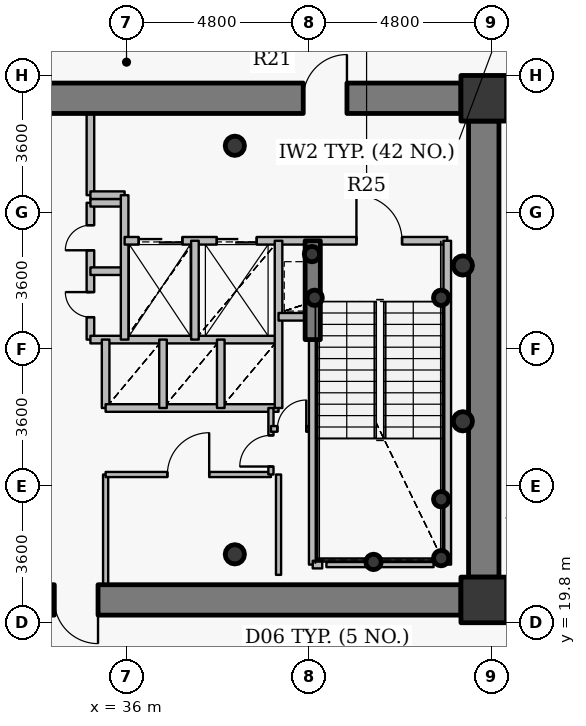
"""IFC4 building model, lengths in metres.
Left out: names, types, materials, properties, quantities, classifications, styles, units other than length and angle.
Written with IfcOpenShell. Run it as: python <this file> out.ifc"""

import sys

from ifc_helpers import new_model, si_unit, direction, frame, frame_2d, origin, origin_2d, place, context, subcontext, project, spatial, rectangle, hollow_circle, extrude, source, transform, mapped, element, fill, save


model = new_model("IFC4")
c1 = context("Model", 3, precision=1e-05, world=origin(), true_north=direction((0.0, 1.0)))
c2 = subcontext(c1, "Body", "Model", "MODEL_VIEW")
j1 = project(units=[si_unit("LENGTHUNIT", "METRE"), si_unit("PLANEANGLEUNIT", "RADIAN")], contexts=[c1])
p1 = place(None, origin())
s1 = spatial("IfcSite", under=j1, at=p1, CompositionType="ELEMENT")
p2 = place(p1, origin())
s2 = spatial("IfcBuilding", under=s1, at=p2, CompositionType="ELEMENT")
p3 = place(p2, frame((0.0, 0.0, 197.4)))
s3 = spatial("IfcBuildingStorey", under=s2, at=p3, CompositionType="ELEMENT", Elevation=197.4)
for number, where, z_axis, x_axis in (
    (1, (45.4, 20.4, 0.0), (0.0, 0.0, 1.0), (1.0, 0.0, 0.0)),
    (2, (45.4, 33.6, 0.0), (0.0, 0.0, 1.0), (1.0, 0.0, 0.0)),
):
    element("IfcColumn", number, at=place(p3, frame(where, z_axis=z_axis, x_axis=x_axis)), inside=s3, PredefinedType="COLUMN", context=c2, shape_type="SweptSolid", body=[
        extrude(rectangle(XDim=1.2, YDim=1.2, at=origin_2d()), origin(), (0.0, 0.0, 1.0), 3.75),
    ])
for number, where, z_axis, x_axis in (
    (3, (38.85, 21.6, 0.0), (0.0, 0.0, 1.0), (1.0, 0.0, 0.0)),
    (4, (38.85, 32.35, 0.0), (0.0, 0.0, 1.0), (1.0, 0.0, 0.0)),
):
    element("IfcColumn", number, at=place(p3, frame(where, z_axis=z_axis, x_axis=x_axis)), inside=s3, PredefinedType="COLUMN", context=c2, shape_type="SweptSolid", body=[
        extrude(hollow_circle(Radius=0.254, WallThickness=0.02, at=origin_2d()), origin(), (0.0, 0.0, 1.0), 3.75),
    ])
for number, where, z_axis, x_axis in (
    (5, (44.28, 21.5, 0.0), (0.0, 0.0, 1.0), (1.0, 0.0, 0.0)),
    (6, (44.28, 23.05, 0.0), (0.0, 0.0, 1.0), (1.0, 0.0, 0.0)),
    (7, (42.5, 21.4, 0.0), (0.0, 0.0, 1.0), (1.0, 0.0, 0.0)),
    (8, (40.95, 28.35, 0.0), (0.0, 0.0, 1.0), (1.0, 0.0, 0.0)),
    (9, (44.28, 28.35, 0.0), (0.0, 0.0, 1.0), (1.0, 0.0, 0.0)),
    (10, (40.88, 29.5, 0.0), (0.0, 0.0, 1.0), (1.0, 0.0, 0.0)),
):
    element("IfcColumn", number, at=place(p3, frame(where, z_axis=z_axis, x_axis=x_axis)), inside=s3, PredefinedType="COLUMN", context=c2, shape_type="SweptSolid", body=[
        extrude(hollow_circle(Radius=0.203, WallThickness=0.016, at=origin_2d()), origin(), (0.0, 0.0, 1.0), 3.75),
    ])
p4 = place(p3, frame((27.2, 33.6, 0.0), z_axis=(0.0, 0.0, 1.0), x_axis=(1.0, 0.0, 0.0)))
e11 = element("IfcWall", 11, at=p4, inside=s3, PredefinedType="SHEAR", context=c2, shape_type="SweptSolid", body=[
    extrude(rectangle(XDim=17.6, YDim=0.8, at=frame_2d((8.8, 0.0))), origin(), (0.0, 0.0, 1.0), 2.95),
])
p5 = place(p4, frame((13.45, 0.0, 0.0)))
e12 = element("IfcOpeningElement", 12, at=p5, cuts=e11, PredefinedType="OPENING", context=c2, shape_type="SweptSolid", body=[
    extrude(rectangle(XDim=1.15, YDim=2.15, at=origin_2d()), frame((0.575, 0.41, 1.075), z_axis=(0.0, -1.0, 0.0), x_axis=(1.0, 0.0, 0.0)), (0.0, 0.0, 1.0), 0.82),
])
p6 = place(p3, frame((45.4, 33.0, 0.0), z_axis=(0.0, 0.0, 1.0), x_axis=(0.0, -1.0, 0.0)))
e13 = element("IfcWall", 13, at=p6, inside=s3, PredefinedType="SHEAR", context=c2, shape_type="SweptSolid", body=[
    extrude(rectangle(XDim=12.0, YDim=0.8, at=frame_2d((6.0, 0.0))), origin(), (0.0, 0.0, 1.0), 2.95),
])
p7 = place(p3, frame((44.8, 20.4, 0.0), z_axis=(0.0, 0.0, 1.0), x_axis=(-1.0, 0.0, 0.0)))
e14 = element("IfcWall", 14, at=p7, inside=s3, PredefinedType="SHEAR", context=c2, shape_type="SweptSolid", body=[
    extrude(rectangle(XDim=17.6, YDim=0.8, at=frame_2d((8.8, 0.0))), origin(), (0.0, 0.0, 1.0), 2.95),
])
p8 = place(p7, frame((9.55, 0.0, 0.0)))
e15 = element("IfcOpeningElement", 15, at=p8, cuts=e14, PredefinedType="OPENING", context=c2, shape_type="SweptSolid", body=[
    extrude(rectangle(XDim=1.15, YDim=2.15, at=origin_2d()), frame((0.575, 0.41, 1.075), z_axis=(0.0, -1.0, 0.0), x_axis=(1.0, 0.0, 0.0)), (0.0, 0.0, 1.0), 0.82),
])
p9 = place(p3, frame((40.9, 27.25, 0.0), z_axis=(0.0, 0.0, 1.0), x_axis=(0.0, 1.0, 0.0)))
e16 = element("IfcWall", 16, at=p9, inside=s3, PredefinedType="SHEAR", context=c2, shape_type="SweptSolid", body=[
    extrude(rectangle(XDim=2.6, YDim=0.4, at=frame_2d((1.3, 0.0))), origin(), (0.0, 0.0, 1.0), 3.1),
])
for number, where, z_axis, x_axis in (
    (17, (44.85, 25.1, 0.0), (0.0, 0.0, 1.0), (1.0, 0.0, 0.0)),
    (18, (44.85, 29.2, 0.0), (0.0, 0.0, 1.0), (1.0, 0.0, 0.0)),
):
    element("IfcColumn", number, at=place(p3, frame(where, z_axis=z_axis, x_axis=x_axis)), inside=s3, PredefinedType="COLUMN", context=c2, shape_type="SweptSolid", body=[
        extrude(hollow_circle(Radius=0.254, WallThickness=0.02, at=origin_2d()), origin(), (0.0, 0.0, 1.0), 3.75),
    ])
p10 = place(p3, frame((35.05, 27.25, 0.0), z_axis=(0.0, 0.0, 1.0), x_axis=(0.0, 1.0, 0.0)))
e19 = element("IfcWall", 19, at=p10, inside=s3, PredefinedType="PARTITIONING", context=c2, shape_type="SweptSolid", body=[
    extrude(rectangle(XDim=3.6, YDim=0.2, at=frame_2d((1.8, 0.0))), origin(), (0.0, 0.0, 1.0), 3.5),
])
p11 = place(p10, frame((0.59, 0.0, 0.0)))
e20 = element("IfcOpeningElement", 20, at=p11, cuts=e19, PredefinedType="OPENING", context=c2, shape_type="SweptSolid", body=[
    extrude(rectangle(XDim=0.66, YDim=2.05, at=origin_2d()), frame((0.33, 0.11, 1.025), z_axis=(0.0, -1.0, 0.0), x_axis=(1.0, 0.0, 0.0)), (0.0, 0.0, 1.0), 0.22),
])
p12 = place(p10, frame((2.35, 0.0, 0.0)))
e21 = element("IfcOpeningElement", 21, at=p12, cuts=e19, PredefinedType="OPENING", context=c2, shape_type="SweptSolid", body=[
    extrude(rectangle(XDim=0.66, YDim=2.05, at=origin_2d()), frame((0.33, 0.11, 1.025), z_axis=(0.0, -1.0, 0.0), x_axis=(1.0, 0.0, 0.0)), (0.0, 0.0, 1.0), 0.22),
])
p13 = place(p3, frame((35.05, 27.25, 0.0), z_axis=(0.0, 0.0, 1.0), x_axis=(1.0, 0.0, 0.0)))
e22 = element("IfcWall", 22, at=p13, inside=s3, PredefinedType="PARTITIONING", context=c2, shape_type="SweptSolid", body=[
    extrude(rectangle(XDim=4.95, YDim=0.2, at=frame_2d((2.475, 0.0))), origin(), (0.0, 0.0, 1.0), 3.085),
])
for number, where, z_axis, x_axis in (
    (23, (35.05, 29.05, 0.0), (0.0, 0.0, 1.0), (1.0, 0.0, 0.0)),
    (24, (35.05, 30.85, 0.0), (0.0, 0.0, 1.0), (1.0, 0.0, 0.0)),
):
    element("IfcWall", number, at=place(p3, frame(where, z_axis=z_axis, x_axis=x_axis)), inside=s3, PredefinedType="PARTITIONING", context=c2, shape_type="SweptSolid", body=[
        extrude(rectangle(XDim=0.9, YDim=0.2, at=frame_2d((0.45, 0.0))), origin(), (0.0, 0.0, 1.0), 3.5),
    ])
p14 = place(p3, frame((35.05, 31.05, 0.0), z_axis=(0.0, 0.0, 1.0), x_axis=(0.0, 1.0, 0.0)))
e25 = element("IfcWall", 25, at=p14, inside=s3, PredefinedType="PARTITIONING", context=c2, shape_type="SweptSolid", body=[
    extrude(rectangle(XDim=2.15, YDim=0.2, at=frame_2d((1.075, 0.0))), origin(), (0.0, 0.0, 1.0), 3.085),
])
p15 = place(p3, frame((35.05, 31.05, 0.0), z_axis=(0.0, 0.0, 1.0), x_axis=(1.0, 0.0, 0.0)))
e26 = element("IfcWall", 26, at=p15, inside=s3, PredefinedType="PARTITIONING", context=c2, shape_type="SweptSolid", body=[
    extrude(rectangle(XDim=0.9, YDim=0.2, at=frame_2d((0.45, 0.0))), origin(), (0.0, 0.0, 1.0), 3.5),
])
p16 = place(p3, frame((35.45, 20.8, 0.0), z_axis=(0.0, 0.0, 1.0), x_axis=(0.0, 1.0, 0.0)))
e27 = element("IfcWall", 27, at=p16, inside=s3, PredefinedType="PARTITIONING", context=c2, shape_type="SweptSolid", body=[
    extrude(rectangle(XDim=2.9, YDim=0.135, at=frame_2d((1.45, 0.0))), origin(), (0.0, 0.0, 1.0), 3.085),
])
p17 = place(p3, frame((35.45, 23.7, 0.0), z_axis=(0.0, 0.0, 1.0), x_axis=(1.0, 0.0, 0.0)))
e28 = element("IfcWall", 28, at=p17, inside=s3, PredefinedType="PARTITIONING", context=c2, shape_type="SweptSolid", body=[
    extrude(rectangle(XDim=4.35, YDim=0.135, at=frame_2d((2.175, 0.0))), origin(), (0.0, 0.0, 1.0), 3.085),
])
p18 = place(p17, frame((1.625, 0.0, 0.0)))
e29 = element("IfcOpeningElement", 29, at=p18, cuts=e28, PredefinedType="OPENING", context=c2, shape_type="SweptSolid", body=[
    extrude(rectangle(XDim=1.1, YDim=2.15, at=origin_2d()), frame((0.55, 0.078, 1.075), z_axis=(0.0, -1.0, 0.0), x_axis=(1.0, 0.0, 0.0)), (0.0, 0.0, 1.0), 0.155),
])
p19 = place(p3, frame((35.45, 25.45, 0.0), z_axis=(0.0, 0.0, 1.0), x_axis=(0.0, 1.0, 0.0)))
e30 = element("IfcWall", 30, at=p19, inside=s3, PredefinedType="PARTITIONING", context=c2, shape_type="SweptSolid", body=[
    extrude(rectangle(XDim=1.8, YDim=0.2, at=frame_2d((0.9, 0.0))), origin(), (0.0, 0.0, 1.0), 3.5),
])
p20 = place(p3, frame((35.45, 25.45, 0.0), z_axis=(0.0, 0.0, 1.0), x_axis=(1.0, 0.0, 0.0)))
e31 = element("IfcWall", 31, at=p20, inside=s3, PredefinedType="PARTITIONING", context=c2, shape_type="SweptSolid", body=[
    extrude(rectangle(XDim=4.55, YDim=0.2, at=frame_2d((2.275, 0.0))), origin(), (0.0, 0.0, 1.0), 3.085),
])
p21 = place(p3, frame((35.95, 27.25, 0.0), z_axis=(0.0, 0.0, 1.0), x_axis=(0.0, 1.0, 0.0)))
e32 = element("IfcWall", 32, at=p21, inside=s3, PredefinedType="PARTITIONING", context=c2, shape_type="SweptSolid", body=[
    extrude(rectangle(XDim=3.8, YDim=0.2, at=frame_2d((1.9, 0.0))), origin(), (0.0, 0.0, 1.0), 3.5),
])
p22 = place(p3, frame((35.95, 29.85, 0.0), z_axis=(0.0, 0.0, 1.0), x_axis=(1.0, 0.0, 0.0)))
e33 = element("IfcWall", 33, at=p22, inside=s3, PredefinedType="PARTITIONING", context=c2, shape_type="SweptSolid", body=[
    extrude(rectangle(XDim=8.49, YDim=0.2, at=frame_2d((4.245, 0.0))), origin(), (0.0, 0.0, 1.0), 3.085),
])
p23 = place(p22, frame((6.1, 0.0, 0.0)))
e34 = element("IfcOpeningElement", 34, at=p23, cuts=e33, PredefinedType="OPENING", context=c2, shape_type="SweptSolid", body=[
    extrude(rectangle(XDim=1.2, YDim=2.15, at=origin_2d()), frame((0.6, 0.11, 1.075), z_axis=(0.0, -1.0, 0.0), x_axis=(1.0, 0.0, 0.0)), (0.0, 0.0, 1.0), 0.22),
])
p24 = place(p22, frame((0.37, 0.0, 0.0)))
e35 = element("IfcOpeningElement", 35, at=p24, cuts=e33, PredefinedType="OPENING", context=c2, shape_type="SweptSolid", body=[
    extrude(rectangle(XDim=1.15, YDim=2.15, at=origin_2d()), frame((0.575, 0.11, 1.075), z_axis=(0.0, -1.0, 0.0), x_axis=(1.0, 0.0, 0.0)), (0.0, 0.0, 1.0), 0.22),
])
p25 = place(p22, frame((2.425, 0.0, 0.0)))
e36 = element("IfcOpeningElement", 36, at=p25, cuts=e33, PredefinedType="OPENING", context=c2, shape_type="SweptSolid", body=[
    extrude(rectangle(XDim=1.05, YDim=2.15, at=origin_2d()), frame((0.525, 0.11, 1.075), z_axis=(0.0, -1.0, 0.0), x_axis=(1.0, 0.0, 0.0)), (0.0, 0.0, 1.0), 0.22),
])
p26 = place(p3, frame((36.96, 25.45, 0.0), z_axis=(0.0, 0.0, 1.0), x_axis=(0.0, 1.0, 0.0)))
e37 = element("IfcWall", 37, at=p26, inside=s3, PredefinedType="PARTITIONING", context=c2, shape_type="SweptSolid", body=[
    extrude(rectangle(XDim=1.8, YDim=0.2, at=frame_2d((0.9, 0.0))), origin(), (0.0, 0.0, 1.0), 3.5),
])
p27 = place(p3, frame((37.8, 27.25, 0.0), z_axis=(0.0, 0.0, 1.0), x_axis=(0.0, 1.0, 0.0)))
e38 = element("IfcWall", 38, at=p27, inside=s3, PredefinedType="PARTITIONING", context=c2, shape_type="SweptSolid", body=[
    extrude(rectangle(XDim=2.6, YDim=0.2, at=frame_2d((1.3, 0.0))), origin(), (0.0, 0.0, 1.0), 3.5),
])
p28 = place(p3, frame((38.48, 25.45, 0.0), z_axis=(0.0, 0.0, 1.0), x_axis=(0.0, 1.0, 0.0)))
e39 = element("IfcWall", 39, at=p28, inside=s3, PredefinedType="PARTITIONING", context=c2, shape_type="SweptSolid", body=[
    extrude(rectangle(XDim=1.8, YDim=0.2, at=frame_2d((0.9, 0.0))), origin(), (0.0, 0.0, 1.0), 3.5),
])
p29 = place(p3, frame((39.8, 23.7, 0.0), z_axis=(0.0, 0.0, 1.0), x_axis=(0.0, 1.0, 0.0)))
e40 = element("IfcWall", 40, at=p29, inside=s3, PredefinedType="PARTITIONING", context=c2, shape_type="SweptSolid", body=[
    extrude(rectangle(XDim=1.75, YDim=0.135, at=frame_2d((0.875, 0.0))), origin(), (0.0, 0.0, 1.0), 3.5),
])
p30 = place(p29, frame((0.21, 0.0, 0.0)))
e41 = element("IfcOpeningElement", 41, at=p30, cuts=e40, PredefinedType="OPENING", context=c2, shape_type="SweptSolid", body=[
    extrude(rectangle(XDim=0.82, YDim=2.1, at=origin_2d()), frame((0.41, 0.078, 1.05), z_axis=(0.0, -1.0, 0.0), x_axis=(1.0, 0.0, 0.0)), (0.0, 0.0, 1.0), 0.155),
])
p31 = place(p3, frame((39.8, 24.9, 0.0), z_axis=(0.0, 0.0, 1.0), x_axis=(1.0, 0.0, 0.0)))
e42 = element("IfcWall", 42, at=p31, inside=s3, PredefinedType="PARTITIONING", context=c2, shape_type="SweptSolid", body=[
    extrude(rectangle(XDim=1.1, YDim=0.15, at=frame_2d((0.55, 0.0))), origin(), (0.0, 0.0, 1.0), 3.5),
])
p32 = place(p31, frame((0.17, 0.0, 0.0)))
e43 = element("IfcOpeningElement", 43, at=p32, cuts=e42, PredefinedType="OPENING", context=c2, shape_type="SweptSolid", body=[
    extrude(rectangle(XDim=0.76, YDim=2.1, at=origin_2d()), frame((0.38, 0.085, 1.05), z_axis=(0.0, -1.0, 0.0), x_axis=(1.0, 0.0, 0.0)), (0.0, 0.0, 1.0), 0.17),
])
p33 = place(p3, frame((40.0, 25.45, 0.0), z_axis=(0.0, 0.0, 1.0), x_axis=(0.0, 1.0, 0.0)))
e44 = element("IfcWall", 44, at=p33, inside=s3, PredefinedType="PARTITIONING", context=c2, shape_type="SweptSolid", body=[
    extrude(rectangle(XDim=4.4, YDim=0.2, at=frame_2d((2.2, 0.0))), origin(), (0.0, 0.0, 1.0), 3.5),
])
p34 = place(p3, frame((40.0, 27.85, 0.0), z_axis=(0.0, 0.0, 1.0), x_axis=(1.0, 0.0, 0.0)))
e45 = element("IfcWall", 45, at=p34, inside=s3, PredefinedType="PARTITIONING", context=c2, shape_type="SweptSolid", body=[
    extrude(rectangle(XDim=0.9, YDim=0.2, at=frame_2d((0.45, 0.0))), origin(), (0.0, 0.0, 1.0), 3.5),
])
p35 = place(p3, frame((40.9, 21.33, 0.0), z_axis=(0.0, 0.0, 1.0), x_axis=(0.0, 1.0, 0.0)))
e46 = element("IfcWall", 46, at=p35, inside=s3, PredefinedType="PARTITIONING", context=c2, shape_type="SweptSolid", body=[
    extrude(rectangle(XDim=5.91, YDim=0.2, at=frame_2d((2.955, 0.0))), origin(), (0.0, 0.0, 1.0), 3.035),
])
p36 = place(p3, frame((40.9, 21.33, 0.0), z_axis=(0.0, 0.0, 1.0), x_axis=(1.0, 0.0, 0.0)))
e47 = element("IfcWall", 47, at=p36, inside=s3, PredefinedType="PARTITIONING", context=c2, shape_type="SweptSolid", body=[
    extrude(rectangle(XDim=0.25, YDim=0.2, at=frame_2d((0.125, 0.0))), origin(), (0.0, 0.0, 1.0), 3.035),
])
p37 = place(p3, frame((44.44, 21.33, 0.0), z_axis=(0.0, 0.0, 1.0), x_axis=(0.0, 1.0, 0.0)))
e48 = element("IfcWall", 48, at=p37, inside=s3, PredefinedType="PARTITIONING", context=c2, shape_type="SweptSolid", body=[
    extrude(rectangle(XDim=8.52, YDim=0.2, at=frame_2d((4.26, 0.0))), origin(), (0.0, 0.0, 1.0), 3.5),
])
p38 = place(p3, frame((45.8, 20.05, 0.0), z_axis=(0.0, 0.0, 1.0), x_axis=(1.0, 0.0, 0.0)))
e49 = element("IfcWall", 49, at=p38, inside=s3, PredefinedType="PARTITIONING", context=c2, shape_type="SweptSolid", body=[
    extrude(rectangle(XDim=2.4, YDim=0.135, at=frame_2d((1.2, 0.0))), origin(), (0.0, 0.0, 1.0), 3.5),
])
p39 = place(p3, frame((45.8, 33.95, 0.0), z_axis=(0.0, 0.0, 1.0), x_axis=(1.0, 0.0, 0.0)))
e50 = element("IfcWall", 50, at=p39, inside=s3, PredefinedType="PARTITIONING", context=c2, shape_type="SweptSolid", body=[
    extrude(rectangle(XDim=9.197, YDim=0.135, at=frame_2d((4.599, 0.0))), origin(), (0.0, 0.0, 1.0), 3.5),
])
p40 = place(p3, frame((44.08, 21.33, 0.0), z_axis=(0.0, 0.0, 1.0), x_axis=(-1.0, 0.0, 0.0)))
e51 = element("IfcWall", 51, at=p40, inside=s3, PredefinedType="PARTITIONING", context=c2, shape_type="SweptSolid", body=[
    extrude(rectangle(XDim=2.82, YDim=0.135, at=frame_2d((1.41, 0.0))), origin(), (0.0, 0.0, 1.0), 3.035),
])
p41 = place(p3, frame((40.0, 23.7, 0.0), z_axis=(0.0, 0.0, 1.0), x_axis=(0.0, -1.0, 0.0)))
e52 = element("IfcWall", 52, at=p41, inside=s3, PredefinedType="PARTITIONING", context=c2, shape_type="SweptSolid", body=[
    extrude(rectangle(XDim=2.64, YDim=0.135, at=frame_2d((1.32, 0.0))), origin(), (0.0, 0.0, 1.0), 3.035),
])
for number, where, z_axis, x_axis in (
    (53, (45.79, 34.0, 0.0), (0.0, 0.0, 1.0), (-1.0, 0.0, 0.0)),
    (54, (44.81, 20.0, 0.0), (0.0, 0.0, 1.0), (1.0, 0.0, 0.0)),
):
    element("IfcWall", number, at=place(p3, frame(where, z_axis=z_axis, x_axis=x_axis)), inside=s3, PredefinedType="PARTITIONING", context=c2, shape_type="SweptSolid", body=[
        extrude(rectangle(XDim=0.98, YDim=0.135, at=frame_2d((0.49, 0.0))), origin(), (0.0, 0.0, 1.0), 2.935),
    ])
for number, where, z_axis, x_axis in (
    (55, (45.8, 33.01, 0.0), (0.0, 0.0, 1.0), (0.0, 1.0, 0.0)),
    (56, (45.8, 20.377, 0.0), (0.0, 0.0, 1.0), (0.0, 1.0, 0.0)),
):
    element("IfcWall", number, at=place(p3, frame(where, z_axis=z_axis, x_axis=x_axis)), inside=s3, PredefinedType="PARTITIONING", context=c2, shape_type="SweptSolid", body=[
        extrude(rectangle(XDim=0.613, YDim=0.135, at=frame_2d((0.306, 0.0))), origin(), (0.0, 0.0, 1.0), 3.5),
    ])
m1 = source(origin(), c2, "Body", "SweptSolid", [
    extrude(rectangle(XDim=1.15, YDim=2.15, at=origin_2d()), frame((0.575, 0.025, 1.075), z_axis=(0.0, -1.0, 0.0), x_axis=(1.0, 0.0, 0.0)), (0.0, 0.0, 1.0), 0.05),
])
p42 = place(p5, origin())
e57 = element("IfcDoor", 57, at=p42, inside=s3, OperationType="SINGLE_SWING_RIGHT", PredefinedType="DOOR", context=c2, shape_type="MappedRepresentation", body=[
    mapped(m1, transform((0.0, 0.0, 0.0), x_axis=(1.0, 0.0, 0.0), y_axis=(0.0, 1.0, 0.0), z_axis=(0.0, 0.0, 1.0), scale=1.0)),
])
fill(e12, e57)
p43 = place(p8, origin())
e58 = element("IfcDoor", 58, at=p43, inside=s3, OperationType="SINGLE_SWING_LEFT", PredefinedType="DOOR", context=c2, shape_type="MappedRepresentation", body=[
    mapped(m1, transform((0.0, 0.0, 0.0), x_axis=(1.0, 0.0, 0.0), y_axis=(0.0, 1.0, 0.0), z_axis=(0.0, 0.0, 1.0), scale=1.0)),
])
fill(e15, e58)
m2 = source(origin(), c2, "Body", "SweptSolid", [
    extrude(rectangle(XDim=1.2, YDim=2.15, at=origin_2d()), frame((0.6, 0.025, 1.075), z_axis=(0.0, -1.0, 0.0), x_axis=(1.0, 0.0, 0.0)), (0.0, 0.0, 1.0), 0.05),
])
p44 = place(p23, origin())
e59 = element("IfcDoor", 59, at=p44, inside=s3, OperationType="SINGLE_SWING_LEFT", PredefinedType="DOOR", context=c2, shape_type="MappedRepresentation", body=[
    mapped(m2, transform((0.0, 0.0, 0.0), x_axis=(1.0, 0.0, 0.0), y_axis=(0.0, 1.0, 0.0), z_axis=(0.0, 0.0, 1.0), scale=1.0)),
])
fill(e34, e59)
m3 = source(origin(), c2, "Body", "SweptSolid", [
    extrude(rectangle(XDim=1.15, YDim=2.15, at=origin_2d()), frame((0.575, 0.025, 1.075), z_axis=(0.0, -1.0, 0.0), x_axis=(1.0, 0.0, 0.0)), (0.0, 0.0, 1.0), 0.05),
])
p45 = place(p24, origin())
e60 = element("IfcDoor", 60, at=p45, inside=s3, OperationType="DOUBLE_DOOR_SLIDING", PredefinedType="USERDEFINED", context=c2, shape_type="MappedRepresentation", body=[
    mapped(m3, transform((0.0, 0.0, 0.0), x_axis=(1.0, 0.0, 0.0), y_axis=(0.0, 1.0, 0.0), z_axis=(0.0, 0.0, 1.0), scale=1.0)),
])
fill(e35, e60)
m4 = source(origin(), c2, "Body", "SweptSolid", [
    extrude(rectangle(XDim=1.05, YDim=2.15, at=origin_2d()), frame((0.525, 0.025, 1.075), z_axis=(0.0, -1.0, 0.0), x_axis=(1.0, 0.0, 0.0)), (0.0, 0.0, 1.0), 0.05),
])
p46 = place(p25, origin())
e61 = element("IfcDoor", 61, at=p46, inside=s3, OperationType="DOUBLE_DOOR_SLIDING", PredefinedType="USERDEFINED", context=c2, shape_type="MappedRepresentation", body=[
    mapped(m4, transform((0.0, 0.0, 0.0), x_axis=(1.0, 0.0, 0.0), y_axis=(0.0, 1.0, 0.0), z_axis=(0.0, 0.0, 1.0), scale=1.0)),
])
fill(e36, e61)
m5 = source(origin(), c2, "Body", "SweptSolid", [
    extrude(rectangle(XDim=0.66, YDim=2.05, at=origin_2d()), frame((0.33, 0.025, 1.025), z_axis=(0.0, -1.0, 0.0), x_axis=(1.0, 0.0, 0.0)), (0.0, 0.0, 1.0), 0.05),
])
p47 = place(p11, origin())
e62 = element("IfcDoor", 62, at=p47, inside=s3, OperationType="SINGLE_SWING_RIGHT", PredefinedType="USERDEFINED", context=c2, shape_type="MappedRepresentation", body=[
    mapped(m5, transform((0.0, 0.0, 0.0), x_axis=(1.0, 0.0, 0.0), y_axis=(0.0, 1.0, 0.0), z_axis=(0.0, 0.0, 1.0), scale=1.0)),
])
fill(e20, e62)
p48 = place(p12, origin())
e63 = element("IfcDoor", 63, at=p48, inside=s3, OperationType="SINGLE_SWING_LEFT", PredefinedType="USERDEFINED", context=c2, shape_type="MappedRepresentation", body=[
    mapped(m5, transform((0.0, 0.0, 0.0), x_axis=(1.0, 0.0, 0.0), y_axis=(0.0, 1.0, 0.0), z_axis=(0.0, 0.0, 1.0), scale=1.0)),
])
fill(e21, e63)
m6 = source(origin(), c2, "Body", "SweptSolid", [
    extrude(rectangle(XDim=1.1, YDim=2.15, at=origin_2d()), frame((0.55, 0.025, 1.075), z_axis=(0.0, -1.0, 0.0), x_axis=(1.0, 0.0, 0.0)), (0.0, 0.0, 1.0), 0.05),
])
p49 = place(p18, origin())
e64 = element("IfcDoor", 64, at=p49, inside=s3, OperationType="SINGLE_SWING_RIGHT", PredefinedType="DOOR", context=c2, shape_type="MappedRepresentation", body=[
    mapped(m6, transform((0.0, 0.0, 0.0), x_axis=(1.0, 0.0, 0.0), y_axis=(0.0, 1.0, 0.0), z_axis=(0.0, 0.0, 1.0), scale=1.0)),
])
fill(e29, e64)
m7 = source(origin(), c2, "Body", "SweptSolid", [
    extrude(rectangle(XDim=0.82, YDim=2.1, at=origin_2d()), frame((0.41, 0.025, 1.05), z_axis=(0.0, -1.0, 0.0), x_axis=(1.0, 0.0, 0.0)), (0.0, 0.0, 1.0), 0.05),
])
p50 = place(p30, origin())
e65 = element("IfcDoor", 65, at=p50, inside=s3, OperationType="SINGLE_SWING_LEFT", PredefinedType="DOOR", context=c2, shape_type="MappedRepresentation", body=[
    mapped(m7, transform((0.0, 0.0, 0.0), x_axis=(1.0, 0.0, 0.0), y_axis=(0.0, 1.0, 0.0), z_axis=(0.0, 0.0, 1.0), scale=1.0)),
])
fill(e41, e65)
m8 = source(origin(), c2, "Body", "SweptSolid", [
    extrude(rectangle(XDim=0.76, YDim=2.1, at=origin_2d()), frame((0.38, 0.025, 1.05), z_axis=(0.0, -1.0, 0.0), x_axis=(1.0, 0.0, 0.0)), (0.0, 0.0, 1.0), 0.05),
])
p51 = place(p32, origin())
e66 = element("IfcDoor", 66, at=p51, inside=s3, OperationType="SINGLE_SWING_RIGHT", PredefinedType="DOOR", context=c2, shape_type="MappedRepresentation", body=[
    mapped(m8, transform((0.0, 0.0, 0.0), x_axis=(1.0, 0.0, 0.0), y_axis=(0.0, 1.0, 0.0), z_axis=(0.0, 0.0, 1.0), scale=1.0)),
])
fill(e43, e66)
save(model, sys.argv[1])
